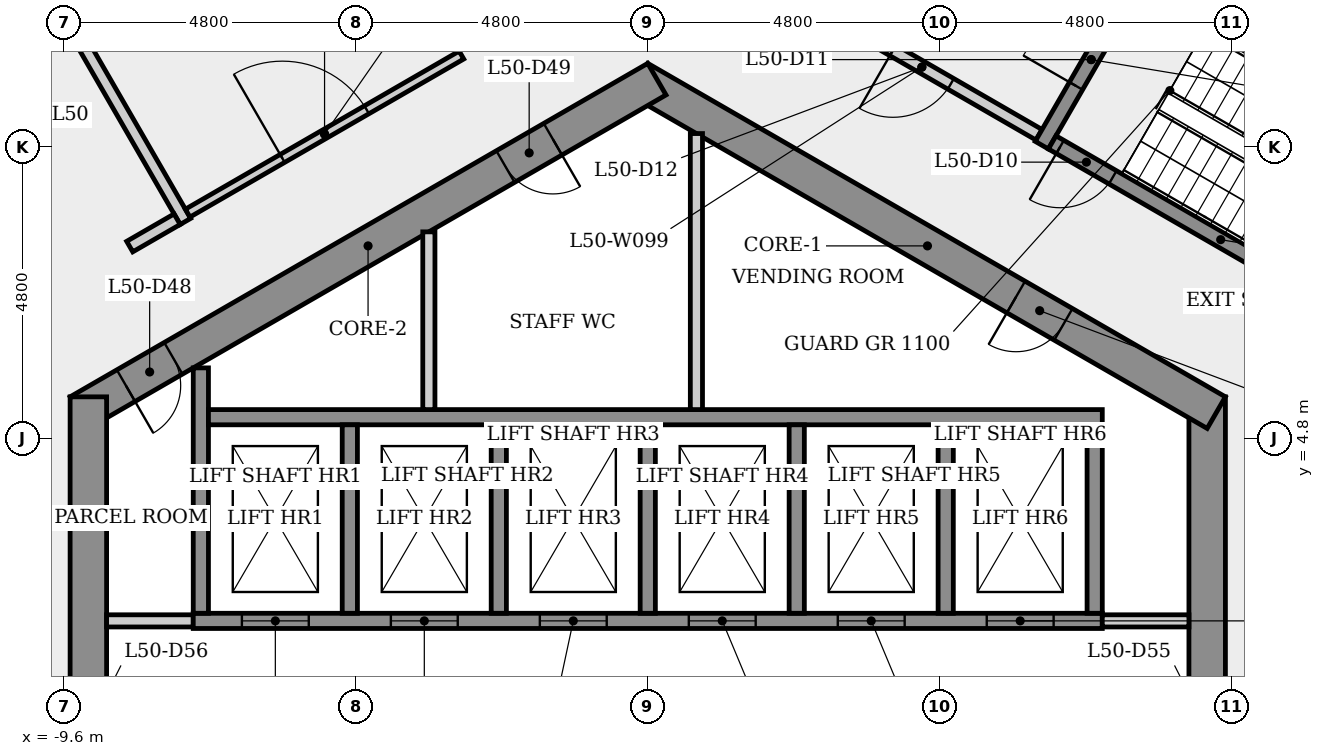
"""IFC4 building model, lengths in metres.
Left out: names, types, materials, properties, quantities, classifications, styles, units other than length and angle.
Written with IfcOpenShell. Run it as: python <this file> out.ifc"""

import sys

from ifc_helpers import new_model, si_unit, direction, frame, frame_2d, origin, place, context, subcontext, project, spatial, rectangle, extrude, element, fill, save


model = new_model("IFC4")
c1 = context("Model", 3, precision=1e-05, world=origin(), true_north=direction((0.0, 1.0)))
c2 = subcontext(c1, "Body", "Model", "MODEL_VIEW")
j1 = project(units=[si_unit("LENGTHUNIT", "METRE"), si_unit("PLANEANGLEUNIT", "RADIAN")], contexts=[c1])
p1 = place(None, origin())
s1 = spatial("IfcSite", under=j1, at=p1, CompositionType="ELEMENT")
p2 = place(p1, origin())
s2 = spatial("IfcBuilding", under=s1, at=p2, CompositionType="ELEMENT")
p3 = place(p2, frame((0.0, 0.0, 186.7)))
s3 = spatial("IfcBuildingStorey", under=s2, at=p3, CompositionType="ELEMENT", Elevation=186.7)
p4 = place(p3, frame((9.2, -5.485, 0.0), z_axis=(0.0, 0.0, 1.0), x_axis=(0.0, 1.0, 0.0)))
e1 = element("IfcWall", 1, at=p4, inside=s3, PredefinedType="SHEAR", context=c2, shape_type="SweptSolid", body=[
    extrude(rectangle(XDim=10.97, YDim=0.6, at=frame_2d((5.485, 0.0))), origin(), (0.0, 0.0, 1.0), 4.0),
])
p5 = place(p4, frame((4.685, 0.0, 0.0)))
e2 = element("IfcOpeningElement", 2, at=p5, cuts=e1, PredefinedType="OPENING", context=c2, shape_type="SweptSolid", body=[
    extrude(rectangle(XDim=1.6, YDim=2.1, at=frame_2d((0.8, 1.05))), frame((0.0, 0.31, 0.0), z_axis=(0.0, -1.0, 0.0), x_axis=(1.0, 0.0, 0.0)), (0.0, 0.0, 1.0), 0.62),
])
p6 = place(p3, frame((9.35, 5.225, 0.0), z_axis=(0.0, 0.0, 1.0), x_axis=(-0.866023993627, 0.500002442456, 0.0)))
e3 = element("IfcWall", 3, at=p6, inside=s3, PredefinedType="SHEAR", context=c2, shape_type="SweptSolid", body=[
    extrude(rectangle(XDim=10.97, YDim=0.6, at=frame_2d((5.485, 0.0))), origin(), (0.0, 0.0, 1.0), 4.0),
])
p7 = place(p6, frame((2.904, 0.0, 0.0)))
e4 = element("IfcOpeningElement", 4, at=p7, cuts=e3, PredefinedType="OPENING", context=c2, shape_type="SweptSolid", body=[
    extrude(rectangle(XDim=0.9, YDim=2.1, at=frame_2d((0.45, 1.05))), frame((0.0, 0.31, 0.0), z_axis=(0.0, -1.0, 0.0), x_axis=(1.0, 0.0, 0.0)), (0.0, 0.0, 1.0), 0.62),
])
p8 = place(p3, frame((0.15, 10.71, 0.0), z_axis=(0.0, 0.0, 1.0), x_axis=(-0.866023993627, -0.500002442456, 0.0)))
e5 = element("IfcWall", 5, at=p8, inside=s3, PredefinedType="SHEAR", context=c2, shape_type="SweptSolid", body=[
    extrude(rectangle(XDim=10.97, YDim=0.6, at=frame_2d((5.485, 0.0))), origin(), (0.0, 0.0, 1.0), 4.0),
])
p9 = place(p8, frame((9.182, 0.0, 0.0)))
e6 = element("IfcOpeningElement", 6, at=p9, cuts=e5, PredefinedType="OPENING", context=c2, shape_type="SweptSolid", body=[
    extrude(rectangle(XDim=0.9, YDim=2.1, at=frame_2d((0.45, 1.05))), frame((0.0, 0.31, 0.0), z_axis=(0.0, -1.0, 0.0), x_axis=(1.0, 0.0, 0.0)), (0.0, 0.0, 1.0), 0.62),
])
p10 = place(p8, frame((1.975, 0.0, 0.0)))
e7 = element("IfcOpeningElement", 7, at=p10, cuts=e5, PredefinedType="OPENING", context=c2, shape_type="SweptSolid", body=[
    extrude(rectangle(XDim=0.9, YDim=2.1, at=frame_2d((0.45, 1.05))), frame((0.0, 0.31, 0.0), z_axis=(0.0, -1.0, 0.0), x_axis=(1.0, 0.0, 0.0)), (0.0, 0.0, 1.0), 0.62),
])
p11 = place(p3, frame((-9.2, 5.485, 0.0), z_axis=(0.0, 0.0, 1.0), x_axis=(0.0, -1.0, 0.0)))
e8 = element("IfcWall", 8, at=p11, inside=s3, PredefinedType="SHEAR", context=c2, shape_type="SweptSolid", body=[
    extrude(rectangle(XDim=10.97, YDim=0.6, at=frame_2d((5.485, 0.0))), origin(), (0.0, 0.0, 1.0), 4.0),
])
p12 = place(p11, frame((8.516, 0.0, 0.0)))
e9 = element("IfcOpeningElement", 9, at=p12, cuts=e8, PredefinedType="OPENING", context=c2, shape_type="SweptSolid", body=[
    extrude(rectangle(XDim=0.9, YDim=2.1, at=frame_2d((0.45, 1.05))), frame((0.0, 0.31, 0.0), z_axis=(0.0, -1.0, 0.0), x_axis=(1.0, 0.0, 0.0)), (0.0, 0.0, 1.0), 0.62),
])
p13 = place(p11, frame((4.685, 0.0, 0.0)))
e10 = element("IfcOpeningElement", 10, at=p13, cuts=e8, PredefinedType="OPENING", context=c2, shape_type="SweptSolid", body=[
    extrude(rectangle(XDim=1.6, YDim=2.1, at=frame_2d((0.8, 1.05))), frame((0.0, 0.31, 0.0), z_axis=(0.0, -1.0, 0.0), x_axis=(1.0, 0.0, 0.0)), (0.0, 0.0, 1.0), 0.62),
])
p14 = place(p3, frame((-17.372, 25.29, 0.0), z_axis=(0.0, 0.0, 1.0), x_axis=(0.5000029704, -0.866023688816, 0.0)))
e11 = element("IfcWall", 11, at=p14, inside=s3, PredefinedType="PLUMBINGWALL", context=c2, shape_type="SweptSolid", body=[
    extrude(rectangle(XDim=19.538, YDim=0.2, at=frame_2d((9.769, 0.0))), origin(), (0.0, 0.0, 1.0), 3.6),
])
p15 = place(p3, frame((-8.9, 1.8, 0.0), z_axis=(0.0, 0.0, 1.0), x_axis=(1.0, 0.0, 0.0)))
e12 = element("IfcWall", 12, at=p15, inside=s3, PredefinedType="PARTITIONING", context=c2, shape_type="SweptSolid", body=[
    extrude(rectangle(XDim=1.425, YDim=0.2, at=frame_2d((0.712, 0.0))), origin(), (0.0, 0.0, 1.0), 3.6),
])
p16 = place(p3, frame((-8.52, 7.956, 0.0), z_axis=(0.0, 0.0, 1.0), x_axis=(0.865964261186, 0.500105887137, 0.0)))
e13 = element("IfcWall", 13, at=p16, inside=s3, PredefinedType="PLUMBINGWALL", context=c2, shape_type="SweptSolid", body=[
    extrude(rectangle(XDim=0.9, YDim=0.2, at=frame_2d((0.45, 0.0))), origin(), (0.0, 0.0, 1.0), 3.6),
])
p17 = place(p3, frame((-7.567, 8.506, 0.0), z_axis=(0.0, 0.0, 1.0), x_axis=(0.866029992723, 0.499992051641, 0.0)))
e14 = element("IfcWall", 14, at=p17, inside=s3, PredefinedType="PARTITIONING", context=c2, shape_type="SweptSolid", body=[
    extrude(rectangle(XDim=5.2, YDim=0.15, at=frame_2d((2.6, 0.0))), origin(), (0.0, 0.0, 1.0), 3.6),
])
p18 = place(p17, frame((1.8, 0.0, 0.0)))
e15 = element("IfcOpeningElement", 15, at=p18, cuts=e14, PredefinedType="OPENING", context=c2, shape_type="SweptSolid", body=[
    extrude(rectangle(XDim=1.6, YDim=2.1, at=frame_2d((0.8, 1.05))), frame((0.0, 0.085, 0.0), z_axis=(0.0, -1.0, 0.0), x_axis=(1.0, 0.0, 0.0)), (0.0, 0.0, 1.0), 0.17),
])
p19 = place(p3, frame((-7.475, 1.8, 0.0), z_axis=(0.0, 0.0, 1.0), x_axis=(1.0, 0.0, 0.0)))
e16 = element("IfcWall", 16, at=p19, inside=s3, PredefinedType="SHEAR", context=c2, shape_type="SweptSolid", body=[
    extrude(rectangle(XDim=14.95, YDim=0.25, at=frame_2d((7.475, 0.0))), origin(), (0.0, 0.0, 1.0), 3.6),
])
p20 = place(p19, frame((0.8, 0.0, 0.0)))
e17 = element("IfcOpeningElement", 17, at=p20, cuts=e16, PredefinedType="OPENING", context=c2, shape_type="SweptSolid", body=[
    extrude(rectangle(XDim=1.1, YDim=2.1, at=frame_2d((0.55, 1.05))), frame((0.0, 0.135, 0.0), z_axis=(0.0, -1.0, 0.0), x_axis=(1.0, 0.0, 0.0)), (0.0, 0.0, 1.0), 0.27),
])
p21 = place(p19, frame((3.25, 0.0, 0.0)))
e18 = element("IfcOpeningElement", 18, at=p21, cuts=e16, PredefinedType="OPENING", context=c2, shape_type="SweptSolid", body=[
    extrude(rectangle(XDim=1.1, YDim=2.1, at=frame_2d((0.55, 1.05))), frame((0.0, 0.135, 0.0), z_axis=(0.0, -1.0, 0.0), x_axis=(1.0, 0.0, 0.0)), (0.0, 0.0, 1.0), 0.27),
])
p22 = place(p19, frame((5.7, 0.0, 0.0)))
e19 = element("IfcOpeningElement", 19, at=p22, cuts=e16, PredefinedType="OPENING", context=c2, shape_type="SweptSolid", body=[
    extrude(rectangle(XDim=1.1, YDim=2.1, at=frame_2d((0.55, 1.05))), frame((0.0, 0.135, 0.0), z_axis=(0.0, -1.0, 0.0), x_axis=(1.0, 0.0, 0.0)), (0.0, 0.0, 1.0), 0.27),
])
p23 = place(p19, frame((8.15, 0.0, 0.0)))
e20 = element("IfcOpeningElement", 20, at=p23, cuts=e16, PredefinedType="OPENING", context=c2, shape_type="SweptSolid", body=[
    extrude(rectangle(XDim=1.1, YDim=2.1, at=frame_2d((0.55, 1.05))), frame((0.0, 0.135, 0.0), z_axis=(0.0, -1.0, 0.0), x_axis=(1.0, 0.0, 0.0)), (0.0, 0.0, 1.0), 0.27),
])
p24 = place(p19, frame((10.6, 0.0, 0.0)))
e21 = element("IfcOpeningElement", 21, at=p24, cuts=e16, PredefinedType="OPENING", context=c2, shape_type="SweptSolid", body=[
    extrude(rectangle(XDim=1.1, YDim=2.1, at=frame_2d((0.55, 1.05))), frame((0.0, 0.135, 0.0), z_axis=(0.0, -1.0, 0.0), x_axis=(1.0, 0.0, 0.0)), (0.0, 0.0, 1.0), 0.27),
])
p25 = place(p19, frame((13.05, 0.0, 0.0)))
e22 = element("IfcOpeningElement", 22, at=p25, cuts=e16, PredefinedType="OPENING", context=c2, shape_type="SweptSolid", body=[
    extrude(rectangle(XDim=1.1, YDim=2.1, at=frame_2d((0.55, 1.05))), frame((0.0, 0.135, 0.0), z_axis=(0.0, -1.0, 0.0), x_axis=(1.0, 0.0, 0.0)), (0.0, 0.0, 1.0), 0.27),
])
p26 = place(p3, frame((-7.35, 1.925, 0.0), z_axis=(0.0, 0.0, 1.0), x_axis=(0.0, 1.0, 0.0)))
e23 = element("IfcWall", 23, at=p26, inside=s3, PredefinedType="SHEAR", context=c2, shape_type="SweptSolid", body=[
    extrude(rectangle(XDim=4.036, YDim=0.25, at=frame_2d((2.018, 0.0))), origin(), (0.0, 0.0, 1.0), 3.6),
])
p27 = place(p3, frame((-7.225, 5.15, 0.0), z_axis=(0.0, 0.0, 1.0), x_axis=(1.0, 0.0, 0.0)))
e24 = element("IfcWall", 24, at=p27, inside=s3, PredefinedType="SHEAR", context=c2, shape_type="SweptSolid", body=[
    extrude(rectangle(XDim=14.7, YDim=0.25, at=frame_2d((7.35, 0.0))), origin(), (0.0, 0.0, 1.0), 3.6),
])
p28 = place(p3, frame((-4.9, 5.025, 0.0), z_axis=(0.0, 0.0, 1.0), x_axis=(0.0, -1.0, 0.0)))
e25 = element("IfcWall", 25, at=p28, inside=s3, PredefinedType="SHEAR", context=c2, shape_type="SweptSolid", body=[
    extrude(rectangle(XDim=3.1, YDim=0.25, at=frame_2d((1.55, 0.0))), origin(), (0.0, 0.0, 1.0), 4.0),
])
p29 = place(p3, frame((-3.6, 8.198, 0.0), z_axis=(0.0, 0.0, 1.0), x_axis=(0.0, -1.0, 0.0)))
e26 = element("IfcWall", 26, at=p29, inside=s3, PredefinedType="PARTITIONING", context=c2, shape_type="SweptSolid", body=[
    extrude(rectangle(XDim=2.924, YDim=0.2, at=frame_2d((1.462, 0.0))), origin(), (0.0, 0.0, 1.0), 3.6),
])
for number, where, z_axis, x_axis in (
    (27, (-2.45, 5.025, 0.0), (0.0, 0.0, 1.0), (0.0, -1.0, 0.0)),
    (28, (0.0, 5.025, 0.0), (0.0, 0.0, 1.0), (0.0, -1.0, 0.0)),
):
    element("IfcWall", number, at=place(p3, frame(where, z_axis=z_axis, x_axis=x_axis)), inside=s3, PredefinedType="SHEAR", context=c2, shape_type="SweptSolid", body=[
        extrude(rectangle(XDim=3.1, YDim=0.25, at=frame_2d((1.55, 0.0))), origin(), (0.0, 0.0, 1.0), 4.0),
    ])
p30 = place(p3, frame((0.8, 9.815, 0.0), z_axis=(0.0, 0.0, 1.0), x_axis=(0.0, -1.0, 0.0)))
e29 = element("IfcWall", 29, at=p30, inside=s3, PredefinedType="PARTITIONING", context=c2, shape_type="SweptSolid", body=[
    extrude(rectangle(XDim=4.54, YDim=0.2, at=frame_2d((2.27, 0.0))), origin(), (0.0, 0.0, 1.0), 3.6),
])
for number, where, z_axis, x_axis in (
    (30, (2.45, 5.025, 0.0), (0.0, 0.0, 1.0), (0.0, -1.0, 0.0)),
    (31, (4.9, 5.025, 0.0), (0.0, 0.0, 1.0), (0.0, -1.0, 0.0)),
):
    element("IfcWall", number, at=place(p3, frame(where, z_axis=z_axis, x_axis=x_axis)), inside=s3, PredefinedType="SHEAR", context=c2, shape_type="SweptSolid", body=[
        extrude(rectangle(XDim=3.1, YDim=0.25, at=frame_2d((1.55, 0.0))), origin(), (0.0, 0.0, 1.0), 4.0),
    ])
p31 = place(p3, frame((6.435, 9.795, 0.0), z_axis=(0.0, 0.0, 1.0), x_axis=(-0.866012907634, 0.500021643343, 0.0)))
e32 = element("IfcWall", 32, at=p31, inside=s3, PredefinedType="PARTITIONING", context=c2, shape_type="SweptSolid", body=[
    extrude(rectangle(XDim=4.45, YDim=0.2, at=frame_2d((2.225, 0.0))), origin(), (0.0, 0.0, 1.0), 3.6),
])
p32 = place(p31, frame((1.675, 0.0, 0.0)))
e33 = element("IfcOpeningElement", 33, at=p32, cuts=e32, PredefinedType="OPENING", context=c2, shape_type="SweptSolid", body=[
    extrude(rectangle(XDim=1.1, YDim=2.1, at=frame_2d((0.55, 1.05))), frame((0.0, 0.11, 0.0), z_axis=(0.0, -1.0, 0.0), x_axis=(1.0, 0.0, 0.0)), (0.0, 0.0, 1.0), 0.22),
])
p33 = place(p3, frame((6.48, 9.624, 0.0), z_axis=(0.0, 0.0, 1.0), x_axis=(0.500017246033, 0.866015446554, 0.0)))
e34 = element("IfcWall", 34, at=p33, inside=s3, PredefinedType="SHEAR", context=c2, shape_type="SweptSolid", body=[
    extrude(rectangle(XDim=3.25, YDim=0.25, at=frame_2d((1.625, 0.0))), origin(), (0.0, 0.0, 1.0), 3.6),
])
p34 = place(p33, frame((1.125, 0.0, 0.0)))
e35 = element("IfcOpeningElement", 35, at=p34, cuts=e34, PredefinedType="OPENING", context=c2, shape_type="SweptSolid", body=[
    extrude(rectangle(XDim=1.0, YDim=2.1, at=frame_2d((0.5, 1.05))), frame((0.0, 0.135, 0.0), z_axis=(0.0, -1.0, 0.0), x_axis=(1.0, 0.0, 0.0)), (0.0, 0.0, 1.0), 0.27),
])
p35 = place(p3, frame((7.475, 1.8, 0.0), z_axis=(0.0, 0.0, 1.0), x_axis=(1.0, 0.0, 0.0)))
e36 = element("IfcWall", 36, at=p35, inside=s3, PredefinedType="PARTITIONING", context=c2, shape_type="SweptSolid", body=[
    extrude(rectangle(XDim=1.425, YDim=0.2, at=frame_2d((0.712, 0.0))), origin(), (0.0, 0.0, 1.0), 3.6),
])
p36 = place(p3, frame((7.35, 5.025, 0.0), z_axis=(0.0, 0.0, 1.0), x_axis=(0.0, -1.0, 0.0)))
e37 = element("IfcWall", 37, at=p36, inside=s3, PredefinedType="SHEAR", context=c2, shape_type="SweptSolid", body=[
    extrude(rectangle(XDim=3.1, YDim=0.25, at=frame_2d((1.55, 0.0))), origin(), (0.0, 0.0, 1.0), 4.0),
])
p37 = place(p3, frame((8.151, 12.268, 0.0), z_axis=(0.0, 0.0, 1.0), x_axis=(0.866025499775, -0.499999833739, 0.0)))
e38 = element("IfcWall", 38, at=p37, inside=s3, PredefinedType="SHEAR", context=c2, shape_type="SweptSolid", body=[
    extrude(rectangle(XDim=6.4, YDim=0.25, at=frame_2d((3.2, 0.0))), origin(), (0.0, 0.0, 1.0), 3.6),
])
p38 = place(p3, frame((12.194, 6.47, 0.0), z_axis=(0.0, 0.0, 1.0), x_axis=(-0.866025499775, 0.499999833739, 0.0)))
e39 = element("IfcWall", 39, at=p38, inside=s3, PredefinedType="SHEAR", context=c2, shape_type="SweptSolid", body=[
    extrude(rectangle(XDim=6.4, YDim=0.25, at=frame_2d((3.2, 0.0))), origin(), (0.0, 0.0, 1.0), 3.6),
])
p39 = place(p38, frame((5.25, 0.0, 0.0)))
e40 = element("IfcOpeningElement", 40, at=p39, cuts=e39, PredefinedType="OPENING", context=c2, shape_type="SweptSolid", body=[
    extrude(rectangle(XDim=1.0, YDim=2.1, at=frame_2d((0.5, 1.05))), frame((0.0, 0.135, 0.0), z_axis=(0.0, -1.0, 0.0), x_axis=(1.0, 0.0, 0.0)), (0.0, 0.0, 1.0), 0.27),
])
p40 = place(p20, origin())
e41 = element("IfcDoor", 41, at=p40, inside=s3, OperationType="SLIDING_TO_LEFT", PredefinedType="DOOR", context=c2, shape_type="SweptSolid", body=[
    extrude(rectangle(XDim=1.1, YDim=2.1, at=frame_2d((0.55, 1.05))), frame((0.0, 0.025, 0.0), z_axis=(0.0, -1.0, 0.0), x_axis=(1.0, 0.0, 0.0)), (0.0, 0.0, 1.0), 0.05),
])
fill(e17, e41)
p41 = place(p21, origin())
e42 = element("IfcDoor", 42, at=p41, inside=s3, OperationType="SLIDING_TO_LEFT", PredefinedType="DOOR", context=c2, shape_type="SweptSolid", body=[
    extrude(rectangle(XDim=1.1, YDim=2.1, at=frame_2d((0.55, 1.05))), frame((0.0, 0.025, 0.0), z_axis=(0.0, -1.0, 0.0), x_axis=(1.0, 0.0, 0.0)), (0.0, 0.0, 1.0), 0.05),
])
fill(e18, e42)
p42 = place(p22, origin())
e43 = element("IfcDoor", 43, at=p42, inside=s3, OperationType="SLIDING_TO_LEFT", PredefinedType="DOOR", context=c2, shape_type="SweptSolid", body=[
    extrude(rectangle(XDim=1.1, YDim=2.1, at=frame_2d((0.55, 1.05))), frame((0.0, 0.025, 0.0), z_axis=(0.0, -1.0, 0.0), x_axis=(1.0, 0.0, 0.0)), (0.0, 0.0, 1.0), 0.05),
])
fill(e19, e43)
p43 = place(p23, origin())
e44 = element("IfcDoor", 44, at=p43, inside=s3, OperationType="SLIDING_TO_LEFT", PredefinedType="DOOR", context=c2, shape_type="SweptSolid", body=[
    extrude(rectangle(XDim=1.1, YDim=2.1, at=frame_2d((0.55, 1.05))), frame((0.0, 0.025, 0.0), z_axis=(0.0, -1.0, 0.0), x_axis=(1.0, 0.0, 0.0)), (0.0, 0.0, 1.0), 0.05),
])
fill(e20, e44)
p44 = place(p24, origin())
e45 = element("IfcDoor", 45, at=p44, inside=s3, OperationType="SLIDING_TO_LEFT", PredefinedType="DOOR", context=c2, shape_type="SweptSolid", body=[
    extrude(rectangle(XDim=1.1, YDim=2.1, at=frame_2d((0.55, 1.05))), frame((0.0, 0.025, 0.0), z_axis=(0.0, -1.0, 0.0), x_axis=(1.0, 0.0, 0.0)), (0.0, 0.0, 1.0), 0.05),
])
fill(e21, e45)
p45 = place(p25, origin())
e46 = element("IfcDoor", 46, at=p45, inside=s3, OperationType="SLIDING_TO_LEFT", PredefinedType="DOOR", context=c2, shape_type="SweptSolid", body=[
    extrude(rectangle(XDim=1.1, YDim=2.1, at=frame_2d((0.55, 1.05))), frame((0.0, 0.025, 0.0), z_axis=(0.0, -1.0, 0.0), x_axis=(1.0, 0.0, 0.0)), (0.0, 0.0, 1.0), 0.05),
])
fill(e22, e46)
p46 = place(p39, origin())
e47 = element("IfcDoor", 47, at=p46, inside=s3, OperationType="SINGLE_SWING_RIGHT", PredefinedType="DOOR", context=c2, shape_type="SweptSolid", body=[
    extrude(rectangle(XDim=1.0, YDim=2.1, at=frame_2d((0.5, 1.05))), frame((0.0, 0.025, 0.0), z_axis=(0.0, -1.0, 0.0), x_axis=(1.0, 0.0, 0.0)), (0.0, 0.0, 1.0), 0.05),
])
fill(e40, e47)
p47 = place(p34, origin())
e48 = element("IfcDoor", 48, at=p47, inside=s3, OperationType="SINGLE_SWING_LEFT", PredefinedType="DOOR", context=c2, shape_type="SweptSolid", body=[
    extrude(rectangle(XDim=1.0, YDim=2.1, at=frame_2d((0.5, 1.05))), frame((0.0, 0.025, 0.0), z_axis=(0.0, -1.0, 0.0), x_axis=(1.0, 0.0, 0.0)), (0.0, 0.0, 1.0), 0.05),
])
fill(e35, e48)
p48 = place(p32, origin())
e49 = element("IfcDoor", 49, at=p48, inside=s3, OperationType="SINGLE_SWING_RIGHT", PredefinedType="DOOR", context=c2, shape_type="SweptSolid", body=[
    extrude(rectangle(XDim=1.1, YDim=2.1, at=frame_2d((0.55, 1.05))), frame((0.0, 0.025, 0.0), z_axis=(0.0, -1.0, 0.0), x_axis=(1.0, 0.0, 0.0)), (0.0, 0.0, 1.0), 0.05),
])
fill(e33, e49)
p49 = place(p18, origin())
e50 = element("IfcDoor", 50, at=p49, inside=s3, OperationType="SINGLE_SWING_LEFT", PredefinedType="DOOR", context=c2, shape_type="SweptSolid", body=[
    extrude(rectangle(XDim=1.6, YDim=2.1, at=frame_2d((0.8, 1.05))), frame((0.0, 0.025, 0.0), z_axis=(0.0, -1.0, 0.0), x_axis=(1.0, 0.0, 0.0)), (0.0, 0.0, 1.0), 0.05),
])
fill(e15, e50)
p50 = place(p9, origin())
e51 = element("IfcDoor", 51, at=p50, inside=s3, OperationType="SINGLE_SWING_RIGHT", PredefinedType="DOOR", context=c2, shape_type="SweptSolid", body=[
    extrude(rectangle(XDim=0.9, YDim=2.1, at=frame_2d((0.45, 1.05))), frame((0.0, 0.025, 0.0), z_axis=(0.0, -1.0, 0.0), x_axis=(1.0, 0.0, 0.0)), (0.0, 0.0, 1.0), 0.05),
])
fill(e6, e51)
p51 = place(p10, origin())
e52 = element("IfcDoor", 52, at=p51, inside=s3, OperationType="SINGLE_SWING_LEFT", PredefinedType="DOOR", context=c2, shape_type="SweptSolid", body=[
    extrude(rectangle(XDim=0.9, YDim=2.1, at=frame_2d((0.45, 1.05))), frame((0.0, 0.025, 0.0), z_axis=(0.0, -1.0, 0.0), x_axis=(1.0, 0.0, 0.0)), (0.0, 0.0, 1.0), 0.05),
])
fill(e7, e52)
p52 = place(p7, origin())
e53 = element("IfcDoor", 53, at=p52, inside=s3, OperationType="SINGLE_SWING_RIGHT", PredefinedType="DOOR", context=c2, shape_type="SweptSolid", body=[
    extrude(rectangle(XDim=0.9, YDim=2.1, at=frame_2d((0.45, 1.05))), frame((0.0, 0.025, 0.0), z_axis=(0.0, -1.0, 0.0), x_axis=(1.0, 0.0, 0.0)), (0.0, 0.0, 1.0), 0.05),
])
fill(e4, e53)
save(model, sys.argv[1])
